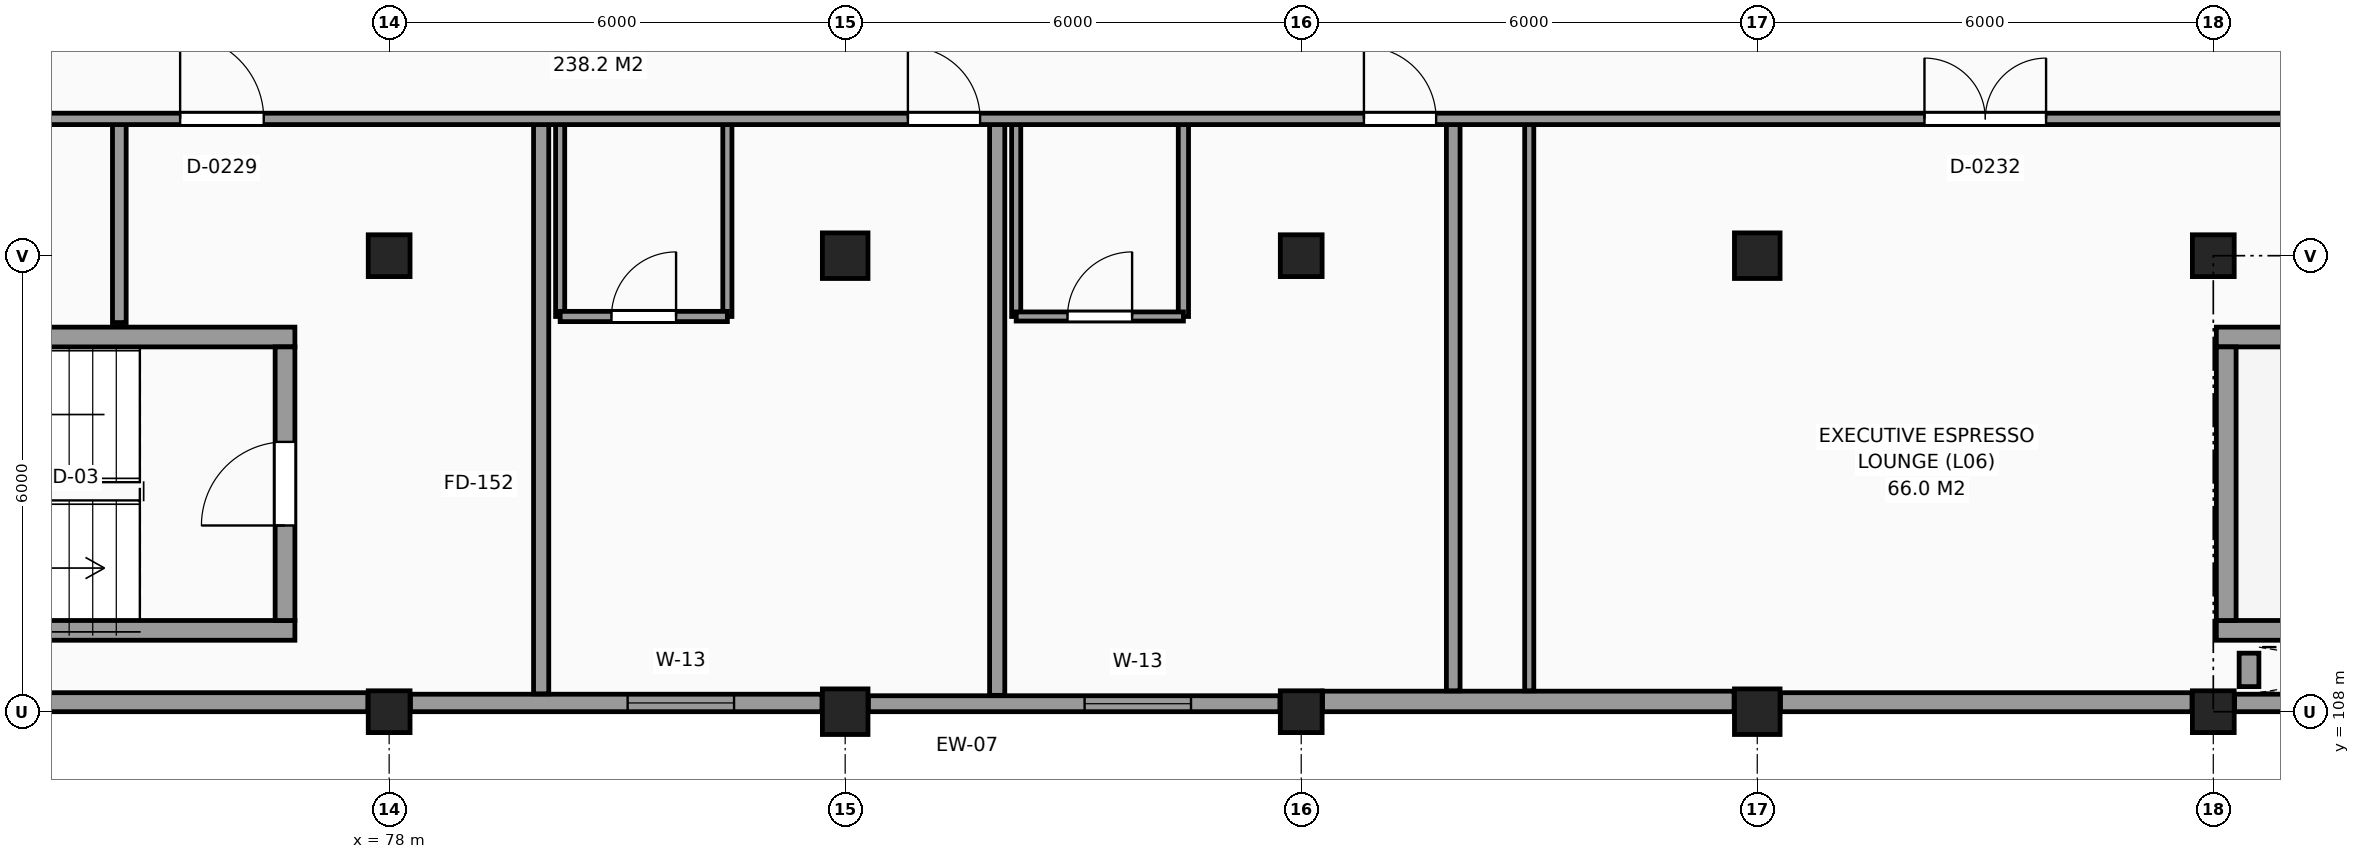
"""IFC4 building model, lengths in metres.
Left out: names, types, materials, properties, quantities, classifications, styles, units other than length and angle.
Written with IfcOpenShell. Run it as: python <this file> out.ifc"""

import sys

from ifc_helpers import new_model, si_unit, direction, frame, frame_2d, origin, origin_2d, place, context, subcontext, project, spatial, rectangle, extrude, element, fill, save


model = new_model("IFC4")
c1 = context("Model", 3, precision=1e-05, world=origin(), true_north=direction((0.0, 1.0)))
c2 = subcontext(c1, "Body", "Model", "MODEL_VIEW")
j1 = project(units=[si_unit("LENGTHUNIT", "METRE"), si_unit("PLANEANGLEUNIT", "RADIAN")], contexts=[c1])
p1 = place(None, origin())
s1 = spatial("IfcSite", under=j1, at=p1, CompositionType="ELEMENT")
p2 = place(p1, origin())
s2 = spatial("IfcBuilding", under=s1, at=p2, CompositionType="ELEMENT")
p3 = place(p2, frame((0.0, 0.0, 28.2)))
s3 = spatial("IfcBuildingStorey", under=s2, at=p3, CompositionType="ELEMENT", Elevation=28.2)
for number, where, z_axis, x_axis in (
    (1, (78.0, 108.0, 0.0), (0.0, 0.0, 1.0), (1.0, 0.0, 0.0)),
    (2, (78.0, 114.0, 0.0), (0.0, 0.0, 1.0), (1.0, 0.0, 0.0)),
):
    element("IfcColumn", number, at=place(p3, frame(where, z_axis=z_axis, x_axis=x_axis)), inside=s3, PredefinedType="COLUMN", context=c2, shape_type="SweptSolid", body=[
        extrude(rectangle(XDim=0.55, YDim=0.55, at=origin_2d()), origin(), (0.0, 0.0, 1.0), 3.3),
    ])
for number, where, z_axis, x_axis in (
    (3, (84.0, 108.0, 0.0), (0.0, 0.0, 1.0), (1.0, 0.0, 0.0)),
    (4, (84.0, 114.0, 0.0), (0.0, 0.0, 1.0), (1.0, 0.0, 0.0)),
):
    element("IfcColumn", number, at=place(p3, frame(where, z_axis=z_axis, x_axis=x_axis)), inside=s3, PredefinedType="COLUMN", context=c2, shape_type="SweptSolid", body=[
        extrude(rectangle(XDim=0.6, YDim=0.6, at=origin_2d()), origin(), (0.0, 0.0, 1.0), 3.3),
    ])
for number, where, z_axis, x_axis in (
    (5, (90.0, 108.0, 0.0), (0.0, 0.0, 1.0), (1.0, 0.0, 0.0)),
    (6, (90.0, 114.0, 0.0), (0.0, 0.0, 1.0), (1.0, 0.0, 0.0)),
):
    element("IfcColumn", number, at=place(p3, frame(where, z_axis=z_axis, x_axis=x_axis)), inside=s3, PredefinedType="COLUMN", context=c2, shape_type="SweptSolid", body=[
        extrude(rectangle(XDim=0.55, YDim=0.55, at=origin_2d()), origin(), (0.0, 0.0, 1.0), 3.3),
    ])
for number, where, z_axis, x_axis in (
    (7, (96.0, 108.0, 0.0), (0.0, 0.0, 1.0), (1.0, 0.0, 0.0)),
    (8, (96.0, 114.0, 0.0), (0.0, 0.0, 1.0), (1.0, 0.0, 0.0)),
):
    element("IfcColumn", number, at=place(p3, frame(where, z_axis=z_axis, x_axis=x_axis)), inside=s3, PredefinedType="COLUMN", context=c2, shape_type="SweptSolid", body=[
        extrude(rectangle(XDim=0.6, YDim=0.6, at=origin_2d()), origin(), (0.0, 0.0, 1.0), 3.3),
    ])
for number, where, z_axis, x_axis in (
    (9, (102.0, 108.0, 0.0), (0.0, 0.0, 1.0), (1.0, 0.0, 0.0)),
    (10, (102.0, 114.0, 0.0), (0.0, 0.0, 1.0), (1.0, 0.0, 0.0)),
):
    element("IfcColumn", number, at=place(p3, frame(where, z_axis=z_axis, x_axis=x_axis)), inside=s3, PredefinedType="COLUMN", context=c2, shape_type="SweptSolid", body=[
        extrude(rectangle(XDim=0.55, YDim=0.55, at=origin_2d()), origin(), (0.0, 0.0, 1.0), 3.3),
    ])
p4 = place(p3, frame((72.305, 108.125, 0.0), z_axis=(0.0, 0.0, 1.0), x_axis=(1.0, 0.0, 0.0)))
e11 = element("IfcWall", 11, at=p4, inside=s3, PredefinedType="SOLIDWALL", context=c2, shape_type="SweptSolid", body=[
    extrude(rectangle(XDim=5.415, YDim=0.25, at=frame_2d((2.708, 0.0))), origin(), (0.0, 0.0, 1.0), 2.43),
])
p5 = place(p3, frame((78.28, 108.115, 0.0), z_axis=(0.0, 0.0, 1.0), x_axis=(1.0, 0.0, 0.0)))
e12 = element("IfcWall", 12, at=p5, inside=s3, PredefinedType="SOLIDWALL", context=c2, shape_type="SweptSolid", body=[
    extrude(rectangle(XDim=5.415, YDim=0.23, at=frame_2d((2.708, 0.0))), origin(), (0.0, 0.0, 1.0), 2.43),
])
p6 = place(p5, frame((2.858, 0.0, 0.8)))
e13 = element("IfcOpeningElement", 13, at=p6, cuts=e12, PredefinedType="OPENING", context=c2, shape_type="SweptSolid", body=[
    extrude(rectangle(XDim=1.4, YDim=1.4, at=frame_2d((0.7, 0.7))), frame((0.0, 0.125, 0.0), z_axis=(0.0, -1.0, 0.0), x_axis=(1.0, 0.0, 0.0)), (0.0, 0.0, 1.0), 0.25),
])
p7 = place(p3, frame((84.305, 108.105, 0.0), z_axis=(0.0, 0.0, 1.0), x_axis=(1.0, 0.0, 0.0)))
e14 = element("IfcWall", 14, at=p7, inside=s3, PredefinedType="SOLIDWALL", context=c2, shape_type="SweptSolid", body=[
    extrude(rectangle(XDim=5.415, YDim=0.21, at=frame_2d((2.708, 0.0))), origin(), (0.0, 0.0, 1.0), 2.43),
])
p8 = place(p7, frame((2.845, 0.0, 0.8)))
e15 = element("IfcOpeningElement", 15, at=p8, cuts=e14, PredefinedType="OPENING", context=c2, shape_type="SweptSolid", body=[
    extrude(rectangle(XDim=1.4, YDim=1.4, at=frame_2d((0.7, 0.7))), frame((0.0, 0.115, 0.0), z_axis=(0.0, -1.0, 0.0), x_axis=(1.0, 0.0, 0.0)), (0.0, 0.0, 1.0), 0.23),
])
p9 = place(p3, frame((90.28, 108.135, 0.0), z_axis=(0.0, 0.0, 1.0), x_axis=(1.0, 0.0, 0.0)))
e16 = element("IfcWall", 16, at=p9, inside=s3, PredefinedType="SOLIDWALL", context=c2, shape_type="SweptSolid", body=[
    extrude(rectangle(XDim=5.415, YDim=0.27, at=frame_2d((2.708, 0.0))), origin(), (0.0, 0.0, 1.0), 2.43),
])
p10 = place(p3, frame((96.305, 108.125, 0.0), z_axis=(0.0, 0.0, 1.0), x_axis=(1.0, 0.0, 0.0)))
e17 = element("IfcWall", 17, at=p10, inside=s3, PredefinedType="SOLIDWALL", context=c2, shape_type="SweptSolid", body=[
    extrude(rectangle(XDim=5.415, YDim=0.25, at=frame_2d((2.708, 0.0))), origin(), (0.0, 0.0, 1.0), 2.43),
])
p11 = place(p3, frame((102.28, 108.115, 0.0), z_axis=(0.0, 0.0, 1.0), x_axis=(1.0, 0.0, 0.0)))
e18 = element("IfcWall", 18, at=p11, inside=s3, PredefinedType="SOLIDWALL", context=c2, shape_type="SweptSolid", body=[
    extrude(rectangle(XDim=5.415, YDim=0.23, at=frame_2d((2.708, 0.0))), origin(), (0.0, 0.0, 1.0), 3.08),
])
for number, where, z_axis, x_axis in (
    (19, (102.04, 109.07, 0.0), (0.0, 0.0, 1.0), (1.0, 0.0, 0.0)),
    (20, (102.04, 112.93, 0.0), (0.0, 0.0, 1.0), (1.0, 0.0, 0.0)),
):
    element("IfcWall", number, at=place(p3, frame(where, z_axis=z_axis, x_axis=x_axis)), inside=s3, PredefinedType="SHEAR", context=c2, shape_type="SweptSolid", body=[
        extrude(rectangle(XDim=10.72, YDim=0.26, at=frame_2d((5.36, 0.0))), origin(), (0.0, 0.0, 1.0), 3.3),
    ])
p12 = place(p3, frame((102.17, 109.2, 0.0), z_axis=(0.0, 0.0, 1.0), x_axis=(0.0, 1.0, 0.0)))
e21 = element("IfcWall", 21, at=p12, inside=s3, PredefinedType="SHEAR", context=c2, shape_type="SweptSolid", body=[
    extrude(rectangle(XDim=3.6, YDim=0.26, at=frame_2d((1.8, 0.0))), origin(), (0.0, 0.0, 1.0), 3.3),
])
p13 = place(p3, frame((102.47, 108.33, 0.0), z_axis=(0.0, 0.0, 1.0), x_axis=(0.0, 1.0, 0.0)))
e22 = element("IfcWall", 22, at=p13, inside=s3, PredefinedType="SHEAR", context=c2, shape_type="SweptSolid", body=[
    extrude(rectangle(XDim=0.44, YDim=0.26, at=frame_2d((0.22, 0.0))), origin(), (0.0, 0.0, 1.0), 3.3),
])
for number, where, z_axis, x_axis in (
    (23, (66.04, 109.07, 0.0), (0.0, 0.0, 1.0), (1.0, 0.0, 0.0)),
    (24, (66.04, 112.93, 0.0), (0.0, 0.0, 1.0), (1.0, 0.0, 0.0)),
):
    element("IfcWall", number, at=place(p3, frame(where, z_axis=z_axis, x_axis=x_axis)), inside=s3, PredefinedType="SHEAR", context=c2, shape_type="SweptSolid", body=[
        extrude(rectangle(XDim=10.72, YDim=0.26, at=frame_2d((5.36, 0.0))), origin(), (0.0, 0.0, 1.0), 3.3),
    ])
p14 = place(p3, frame((76.63, 109.2, 0.0), z_axis=(0.0, 0.0, 1.0), x_axis=(0.0, 1.0, 0.0)))
e25 = element("IfcWall", 25, at=p14, inside=s3, PredefinedType="SHEAR", context=c2, shape_type="SweptSolid", body=[
    extrude(rectangle(XDim=3.6, YDim=0.26, at=frame_2d((1.8, 0.0))), origin(), (0.0, 0.0, 1.0), 3.3),
])
p15 = place(p14, frame((1.25, 0.0, 0.0)))
e26 = element("IfcOpeningElement", 26, at=p15, cuts=e25, PredefinedType="OPENING", context=c2, shape_type="SweptSolid", body=[
    extrude(rectangle(XDim=1.1, YDim=2.15, at=frame_2d((0.55, 1.075))), frame((0.0, 0.14, 0.0), z_axis=(0.0, -1.0, 0.0), x_axis=(1.0, 0.0, 0.0)), (0.0, 0.0, 1.0), 0.28),
])
p16 = place(p3, frame((74.45, 113.12, 0.0), z_axis=(0.0, 0.0, 1.0), x_axis=(0.0, 1.0, 0.0)))
e27 = element("IfcWall", 27, at=p16, inside=s3, PredefinedType="PARTITIONING", context=c2, shape_type="SweptSolid", body=[
    extrude(rectangle(XDim=2.68, YDim=0.18, at=frame_2d((1.34, 0.0))), origin(), (0.0, 0.0, 1.0), 3.08),
])
p17 = place(p3, frame((80.0, 108.235, 0.0), z_axis=(0.0, 0.0, 1.0), x_axis=(0.0, 1.0, 0.0)))
e28 = element("IfcWall", 28, at=p17, inside=s3, PredefinedType="PARTITIONING", context=c2, shape_type="SweptSolid", body=[
    extrude(rectangle(XDim=7.565, YDim=0.2, at=frame_2d((3.782, 0.0))), origin(), (0.0, 0.0, 1.0), 3.08),
])
for number, where, z_axis, x_axis in (
    (29, (80.25, 113.2, 0.0), (0.0, 0.0, 1.0), (0.0, 1.0, 0.0)),
    (30, (82.45, 113.2, 0.0), (0.0, 0.0, 1.0), (0.0, 1.0, 0.0)),
):
    element("IfcWall", number, at=place(p3, frame(where, z_axis=z_axis, x_axis=x_axis)), inside=s3, PredefinedType="PARTITIONING", context=c2, shape_type="SweptSolid", body=[
        extrude(rectangle(XDim=2.6, YDim=0.12, at=frame_2d((1.3, 0.0))), origin(), (0.0, 0.0, 1.0), 3.08),
    ])
p18 = place(p3, frame((86.0, 108.215, 0.0), z_axis=(0.0, 0.0, 1.0), x_axis=(0.0, 1.0, 0.0)))
e31 = element("IfcWall", 31, at=p18, inside=s3, PredefinedType="PARTITIONING", context=c2, shape_type="SweptSolid", body=[
    extrude(rectangle(XDim=7.585, YDim=0.2, at=frame_2d((3.792, 0.0))), origin(), (0.0, 0.0, 1.0), 3.08),
])
p19 = place(p3, frame((86.25, 113.2, 0.0), z_axis=(0.0, 0.0, 1.0), x_axis=(0.0, 1.0, 0.0)))
e32 = element("IfcWall", 32, at=p19, inside=s3, PredefinedType="PARTITIONING", context=c2, shape_type="SweptSolid", body=[
    extrude(rectangle(XDim=2.6, YDim=0.12, at=frame_2d((1.3, 0.0))), origin(), (0.0, 0.0, 1.0), 3.08),
])
p20 = place(p3, frame((88.45, 113.2, 0.0), z_axis=(0.0, 0.0, 1.0), x_axis=(0.0, 1.0, 0.0)))
e33 = element("IfcWall", 33, at=p20, inside=s3, PredefinedType="PARTITIONING", context=c2, shape_type="SweptSolid", body=[
    extrude(rectangle(XDim=2.6, YDim=0.135, at=frame_2d((1.3, 0.0))), origin(), (0.0, 0.0, 1.0), 3.08),
])
p21 = place(p3, frame((92.0, 108.275, 0.0), z_axis=(0.0, 0.0, 1.0), x_axis=(0.0, 1.0, 0.0)))
e34 = element("IfcWall", 34, at=p21, inside=s3, PredefinedType="PARTITIONING", context=c2, shape_type="SweptSolid", body=[
    extrude(rectangle(XDim=7.525, YDim=0.18, at=frame_2d((3.763, 0.0))), origin(), (0.0, 0.0, 1.0), 3.08),
])
p22 = place(p3, frame((93.0, 108.275, 0.0), z_axis=(0.0, 0.0, 1.0), x_axis=(0.0, 1.0, 0.0)))
e35 = element("IfcWall", 35, at=p22, inside=s3, PredefinedType="PARTITIONING", context=c2, shape_type="SweptSolid", body=[
    extrude(rectangle(XDim=7.525, YDim=0.12, at=frame_2d((3.763, 0.0))), origin(), (0.0, 0.0, 1.0), 3.08),
])
p23 = place(p3, frame((80.25, 113.2, 0.0), z_axis=(0.0, 0.0, 1.0), x_axis=(1.0, 0.0, 0.0)))
e36 = element("IfcWall", 36, at=p23, inside=s3, PredefinedType="PARTITIONING", context=c2, shape_type="SweptSolid", body=[
    extrude(rectangle(XDim=2.2, YDim=0.135, at=frame_2d((1.1, 0.0))), origin(), (0.0, 0.0, 1.0), 3.08),
])
p24 = place(p23, frame((0.675, 0.0, 0.0)))
e37 = element("IfcOpeningElement", 37, at=p24, cuts=e36, PredefinedType="OPENING", context=c2, shape_type="SweptSolid", body=[
    extrude(rectangle(XDim=0.85, YDim=2.1, at=frame_2d((0.425, 1.05))), frame((0.0, 0.078, 0.0), z_axis=(0.0, -1.0, 0.0), x_axis=(1.0, 0.0, 0.0)), (0.0, 0.0, 1.0), 0.155),
])
p25 = place(p3, frame((86.25, 113.2, 0.0), z_axis=(0.0, 0.0, 1.0), x_axis=(1.0, 0.0, 0.0)))
e38 = element("IfcWall", 38, at=p25, inside=s3, PredefinedType="PARTITIONING", context=c2, shape_type="SweptSolid", body=[
    extrude(rectangle(XDim=2.2, YDim=0.12, at=frame_2d((1.1, 0.0))), origin(), (0.0, 0.0, 1.0), 3.08),
])
p26 = place(p25, frame((0.675, 0.0, 0.0)))
e39 = element("IfcOpeningElement", 39, at=p26, cuts=e38, PredefinedType="OPENING", context=c2, shape_type="SweptSolid", body=[
    extrude(rectangle(XDim=0.85, YDim=2.1, at=frame_2d((0.425, 1.05))), frame((0.0, 0.07, 0.0), z_axis=(0.0, -1.0, 0.0), x_axis=(1.0, 0.0, 0.0)), (0.0, 0.0, 1.0), 0.14),
])
p27 = place(p3, frame((66.235, 115.8, 0.0), z_axis=(0.0, 0.0, 1.0), x_axis=(1.0, 0.0, 0.0)))
e40 = element("IfcWall", 40, at=p27, inside=s3, PredefinedType="PARTITIONING", context=c2, shape_type="SweptSolid", body=[
    extrude(rectangle(XDim=103.565, YDim=0.15, at=frame_2d((51.782, 0.0))), origin(), (0.0, 0.0, 1.0), 3.08),
])
p28 = place(p27, frame((80.165, 0.0, 0.0)))
e41 = element("IfcOpeningElement", 41, at=p28, cuts=e40, PredefinedType="OPENING", context=c2, shape_type="SweptSolid", body=[
    extrude(rectangle(XDim=1.2, YDim=2.2, at=frame_2d((0.6, 1.1))), frame((0.0, 0.085, 0.0), z_axis=(0.0, -1.0, 0.0), x_axis=(1.0, 0.0, 0.0)), (0.0, 0.0, 1.0), 0.17),
])
p29 = place(p27, frame((50.165, 0.0, 0.0)))
e42 = element("IfcOpeningElement", 42, at=p29, cuts=e40, PredefinedType="OPENING", context=c2, shape_type="SweptSolid", body=[
    extrude(rectangle(XDim=1.2, YDim=2.2, at=frame_2d((0.6, 1.1))), frame((0.0, 0.085, 0.0), z_axis=(0.0, -1.0, 0.0), x_axis=(1.0, 0.0, 0.0)), (0.0, 0.0, 1.0), 0.17),
])
p30 = place(p27, frame((9.015, 0.0, 0.0)))
e43 = element("IfcOpeningElement", 43, at=p30, cuts=e40, PredefinedType="OPENING", context=c2, shape_type="SweptSolid", body=[
    extrude(rectangle(XDim=1.1, YDim=2.15, at=frame_2d((0.55, 1.075))), frame((0.0, 0.085, 0.0), z_axis=(0.0, -1.0, 0.0), x_axis=(1.0, 0.0, 0.0)), (0.0, 0.0, 1.0), 0.17),
])
p31 = place(p27, frame((55.315, 0.0, 0.0)))
e44 = element("IfcOpeningElement", 44, at=p31, cuts=e40, PredefinedType="OPENING", context=c2, shape_type="SweptSolid", body=[
    extrude(rectangle(XDim=1.0, YDim=2.15, at=frame_2d((0.5, 1.075))), frame((0.0, 0.085, 0.0), z_axis=(0.0, -1.0, 0.0), x_axis=(1.0, 0.0, 0.0)), (0.0, 0.0, 1.0), 0.17),
])
p32 = place(p27, frame((62.285, 0.0, 0.0)))
e45 = element("IfcOpeningElement", 45, at=p32, cuts=e40, PredefinedType="OPENING", context=c2, shape_type="SweptSolid", body=[
    extrude(rectangle(XDim=0.96, YDim=2.15, at=frame_2d((0.48, 1.075))), frame((0.0, 0.085, 0.0), z_axis=(0.0, -1.0, 0.0), x_axis=(1.0, 0.0, 0.0)), (0.0, 0.0, 1.0), 0.17),
])
p33 = place(p27, frame((31.965, 0.0, 0.0)))
e46 = element("IfcOpeningElement", 46, at=p33, cuts=e40, PredefinedType="OPENING", context=c2, shape_type="SweptSolid", body=[
    extrude(rectangle(XDim=1.6, YDim=2.25, at=frame_2d((0.8, 1.125))), frame((0.0, 0.085, 0.0), z_axis=(0.0, -1.0, 0.0), x_axis=(1.0, 0.0, 0.0)), (0.0, 0.0, 1.0), 0.17),
])
p34 = place(p27, frame((18.59, 0.0, 0.0)))
e47 = element("IfcOpeningElement", 47, at=p34, cuts=e40, PredefinedType="OPENING", context=c2, shape_type="SweptSolid", body=[
    extrude(rectangle(XDim=0.95, YDim=2.1, at=frame_2d((0.475, 1.05))), frame((0.0, 0.085, 0.0), z_axis=(0.0, -1.0, 0.0), x_axis=(1.0, 0.0, 0.0)), (0.0, 0.0, 1.0), 0.17),
])
p35 = place(p27, frame((24.59, 0.0, 0.0)))
e48 = element("IfcOpeningElement", 48, at=p35, cuts=e40, PredefinedType="OPENING", context=c2, shape_type="SweptSolid", body=[
    extrude(rectangle(XDim=0.95, YDim=2.1, at=frame_2d((0.475, 1.05))), frame((0.0, 0.085, 0.0), z_axis=(0.0, -1.0, 0.0), x_axis=(1.0, 0.0, 0.0)), (0.0, 0.0, 1.0), 0.17),
])
p36 = place(p27, frame((84.49, 0.0, 0.0)))
e49 = element("IfcOpeningElement", 49, at=p36, cuts=e40, PredefinedType="OPENING", context=c2, shape_type="SweptSolid", body=[
    extrude(rectangle(XDim=0.95, YDim=2.1, at=frame_2d((0.475, 1.05))), frame((0.0, 0.085, 0.0), z_axis=(0.0, -1.0, 0.0), x_axis=(1.0, 0.0, 0.0)), (0.0, 0.0, 1.0), 0.17),
])
p37 = place(p6, origin())
e50 = element("IfcWindow", 50, at=p37, inside=s3, PartitioningType="SINGLE_PANEL", PredefinedType="WINDOW", context=c2, shape_type="SweptSolid", body=[
    extrude(rectangle(XDim=1.4, YDim=1.4, at=frame_2d((0.7, 0.7))), frame((0.0, 0.03, 0.0), z_axis=(0.0, -1.0, 0.0), x_axis=(1.0, 0.0, 0.0)), (0.0, 0.0, 1.0), 0.06),
])
fill(e13, e50)
p38 = place(p8, origin())
e51 = element("IfcWindow", 51, at=p38, inside=s3, PartitioningType="SINGLE_PANEL", PredefinedType="WINDOW", context=c2, shape_type="SweptSolid", body=[
    extrude(rectangle(XDim=1.4, YDim=1.4, at=frame_2d((0.7, 0.7))), frame((0.0, 0.03, 0.0), z_axis=(0.0, -1.0, 0.0), x_axis=(1.0, 0.0, 0.0)), (0.0, 0.0, 1.0), 0.06),
])
fill(e15, e51)
p39 = place(p15, origin())
e52 = element("IfcDoor", 52, at=p39, inside=s3, OperationType="SINGLE_SWING_LEFT", PredefinedType="DOOR", context=c2, shape_type="SweptSolid", body=[
    extrude(rectangle(XDim=1.1, YDim=2.15, at=frame_2d((0.55, 1.075))), frame((0.0, 0.025, 0.0), z_axis=(0.0, -1.0, 0.0), x_axis=(1.0, 0.0, 0.0)), (0.0, 0.0, 1.0), 0.05),
])
fill(e26, e52)
p40 = place(p30, origin())
e53 = element("IfcDoor", 53, at=p40, inside=s3, OperationType="SINGLE_SWING_LEFT", PredefinedType="DOOR", context=c2, shape_type="SweptSolid", body=[
    extrude(rectangle(XDim=1.1, YDim=2.15, at=frame_2d((0.55, 1.075))), frame((0.0, 0.025, 0.0), z_axis=(0.0, -1.0, 0.0), x_axis=(1.0, 0.0, 0.0)), (0.0, 0.0, 1.0), 0.05),
])
fill(e43, e53)
p41 = place(p33, origin())
e54 = element("IfcDoor", 54, at=p41, inside=s3, OperationType="DOUBLE_DOOR_SINGLE_SWING", PredefinedType="DOOR", context=c2, shape_type="SweptSolid", body=[
    extrude(rectangle(XDim=1.6, YDim=2.25, at=frame_2d((0.8, 1.125))), frame((0.0, 0.025, 0.0), z_axis=(0.0, -1.0, 0.0), x_axis=(1.0, 0.0, 0.0)), (0.0, 0.0, 1.0), 0.05),
])
fill(e46, e54)
p42 = place(p24, origin())
e55 = element("IfcDoor", 55, at=p42, inside=s3, OperationType="SINGLE_SWING_RIGHT", PredefinedType="DOOR", context=c2, shape_type="SweptSolid", body=[
    extrude(rectangle(XDim=0.85, YDim=2.1, at=frame_2d((0.425, 1.05))), frame((0.0, 0.025, 0.0), z_axis=(0.0, -1.0, 0.0), x_axis=(1.0, 0.0, 0.0)), (0.0, 0.0, 1.0), 0.05),
])
fill(e37, e55)
p43 = place(p34, origin())
e56 = element("IfcDoor", 56, at=p43, inside=s3, OperationType="SINGLE_SWING_LEFT", PredefinedType="DOOR", context=c2, shape_type="SweptSolid", body=[
    extrude(rectangle(XDim=0.95, YDim=2.1, at=frame_2d((0.475, 1.05))), frame((0.0, 0.025, 0.0), z_axis=(0.0, -1.0, 0.0), x_axis=(1.0, 0.0, 0.0)), (0.0, 0.0, 1.0), 0.05),
])
fill(e47, e56)
p44 = place(p26, origin())
e57 = element("IfcDoor", 57, at=p44, inside=s3, OperationType="SINGLE_SWING_RIGHT", PredefinedType="DOOR", context=c2, shape_type="SweptSolid", body=[
    extrude(rectangle(XDim=0.85, YDim=2.1, at=frame_2d((0.425, 1.05))), frame((0.0, 0.025, 0.0), z_axis=(0.0, -1.0, 0.0), x_axis=(1.0, 0.0, 0.0)), (0.0, 0.0, 1.0), 0.05),
])
fill(e39, e57)
p45 = place(p35, origin())
e58 = element("IfcDoor", 58, at=p45, inside=s3, OperationType="SINGLE_SWING_LEFT", PredefinedType="DOOR", context=c2, shape_type="SweptSolid", body=[
    extrude(rectangle(XDim=0.95, YDim=2.1, at=frame_2d((0.475, 1.05))), frame((0.0, 0.025, 0.0), z_axis=(0.0, -1.0, 0.0), x_axis=(1.0, 0.0, 0.0)), (0.0, 0.0, 1.0), 0.05),
])
fill(e48, e58)
save(model, sys.argv[1])
